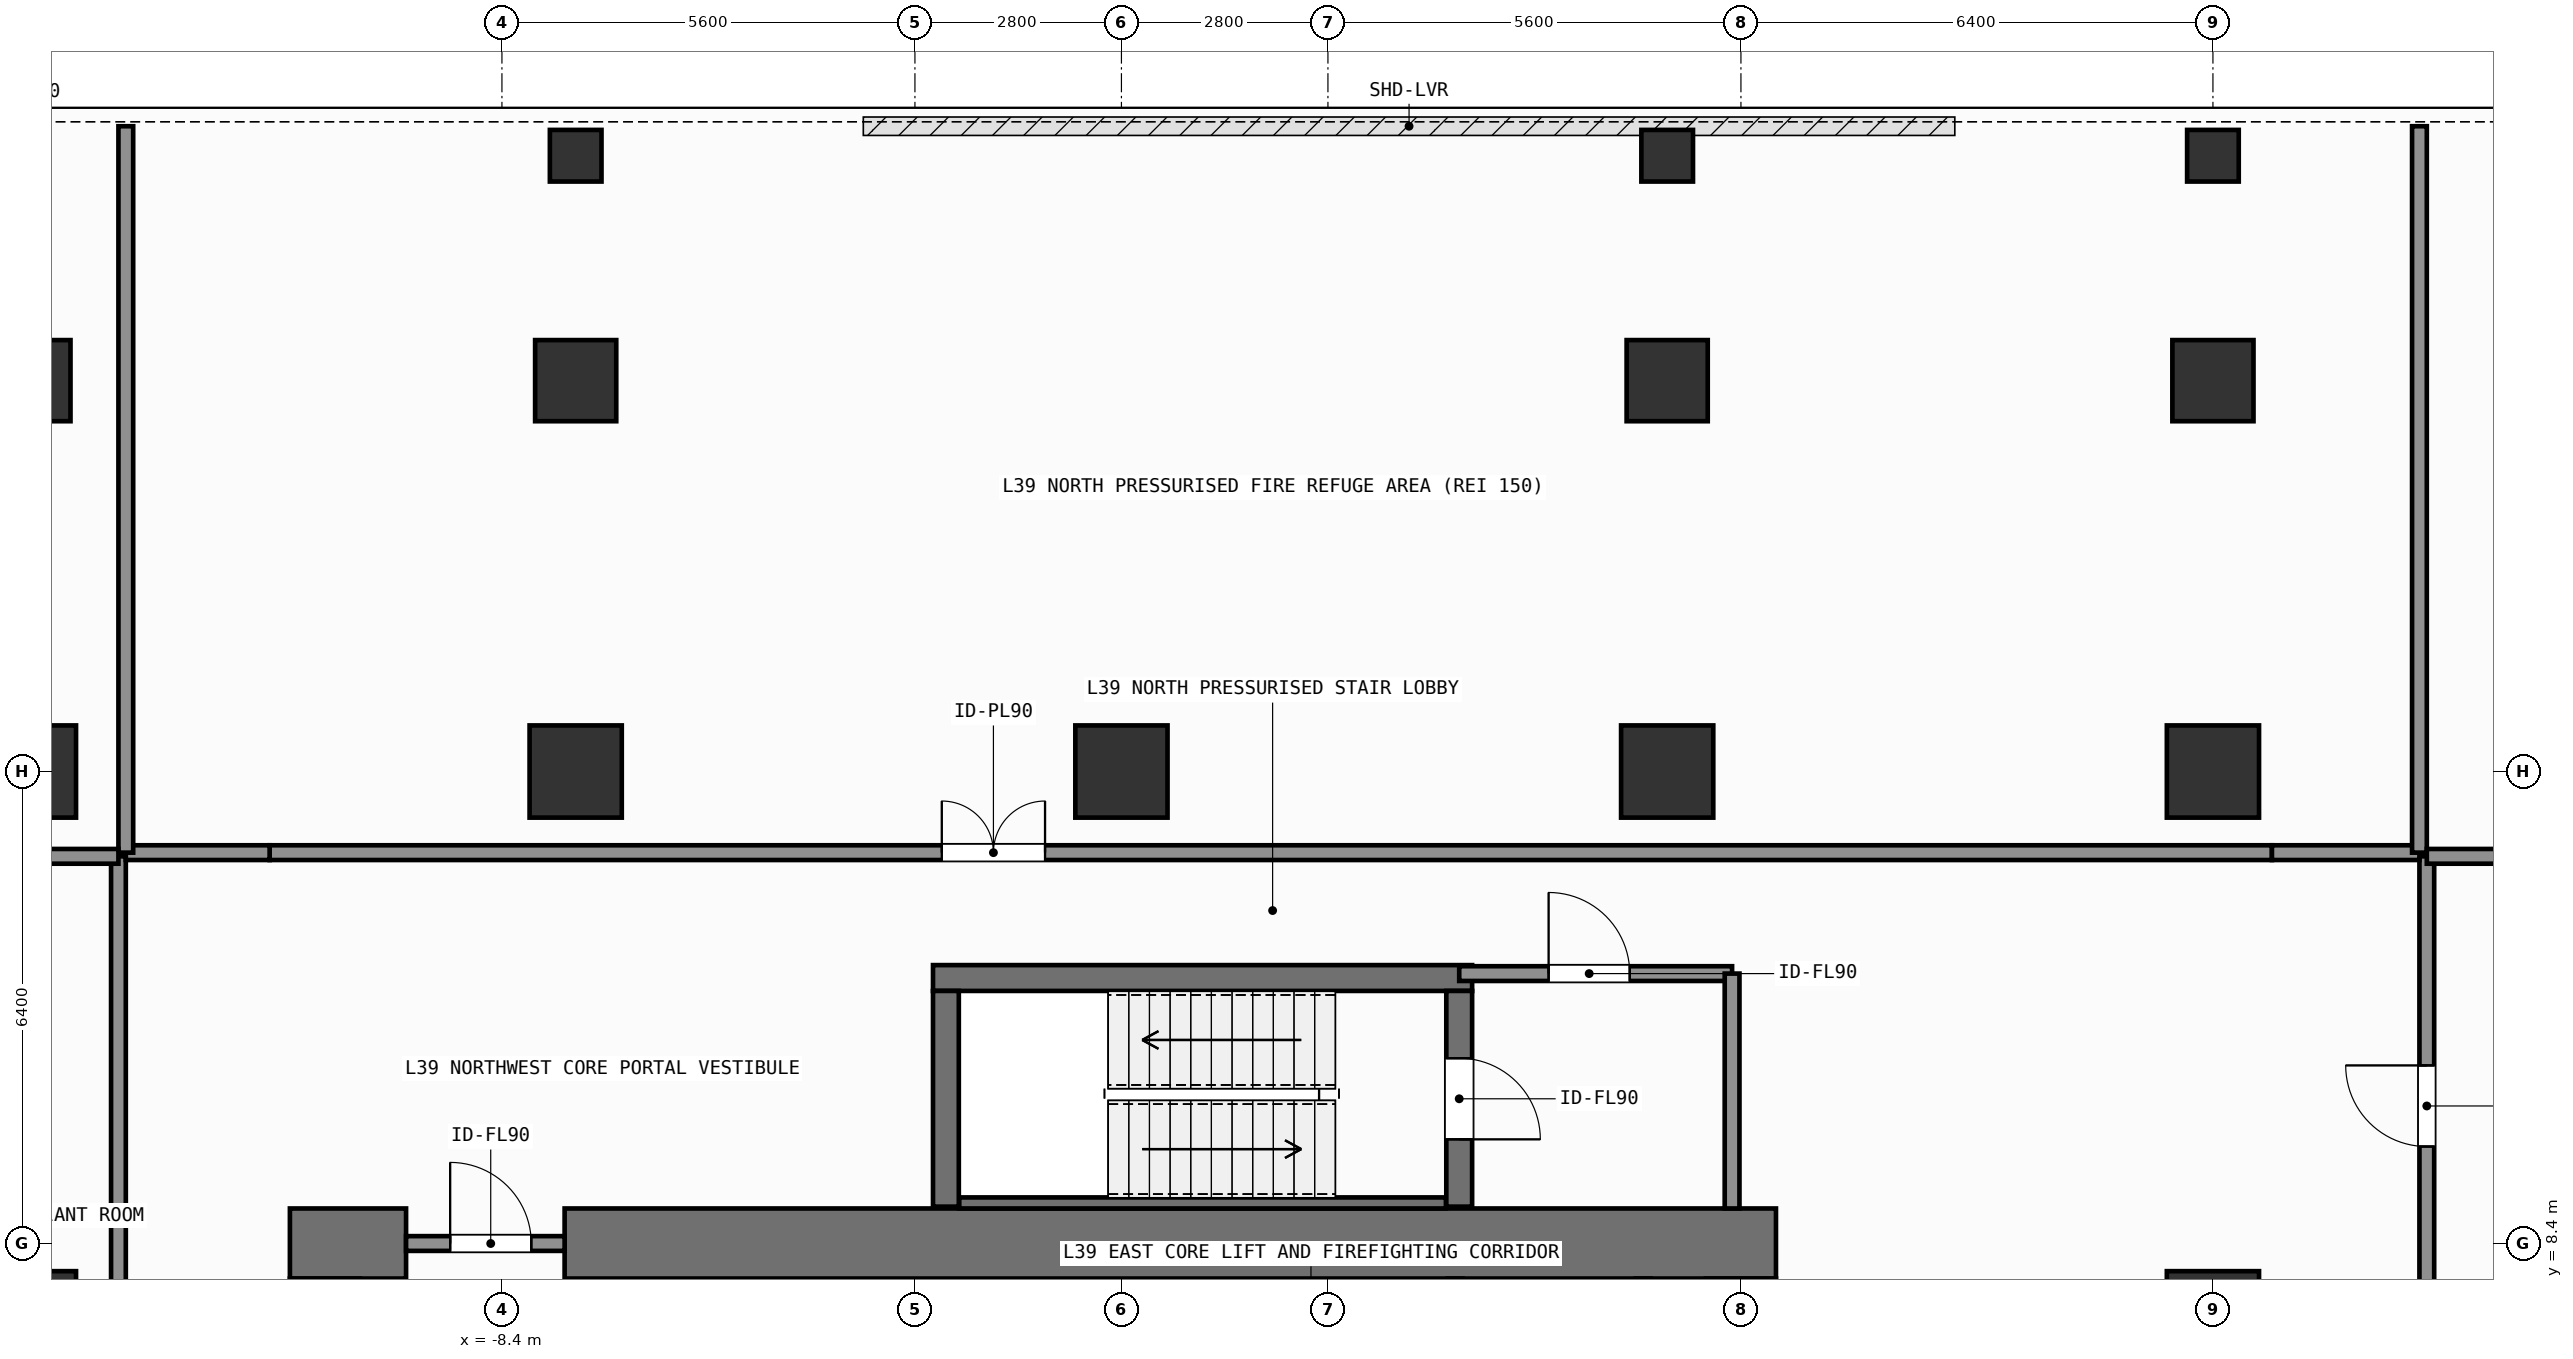
"""IFC4 building model, lengths in metres.
Left out: names, types, materials, properties, quantities, classifications, styles, units other than length and angle.
Written with IfcOpenShell. Run it as: python <this file> out.ifc"""

import sys

from ifc_helpers import new_model, si_unit, direction, frame, frame_2d, origin, origin_2d, place, context, subcontext, project, spatial, rectangle, hollow_rectangle, extrude, element, fill, save


model = new_model("IFC4")
c1 = context("Model", 3, precision=1e-05, world=origin(), true_north=direction((0.0, 1.0)))
c2 = subcontext(c1, "Body", "Model", "MODEL_VIEW")
j1 = project(units=[si_unit("LENGTHUNIT", "METRE"), si_unit("PLANEANGLEUNIT", "RADIAN")], contexts=[c1])
p1 = place(None, origin())
s1 = spatial("IfcSite", under=j1, at=p1, CompositionType="ELEMENT")
p2 = place(p1, origin())
s2 = spatial("IfcBuilding", under=s1, at=p2, CompositionType="ELEMENT")
p3 = place(p2, frame((0.0, 0.0, 156.3)))
s3 = spatial("IfcBuildingStorey", under=s2, at=p3, CompositionType="ELEMENT", Elevation=156.3)
p4 = place(p3, frame((-11.275, 8.4, 0.0), z_axis=(0.0, 0.0, 1.0), x_axis=(1.0, 0.0, 0.0)))
e1 = element("IfcWall", 1, at=p4, inside=s3, PredefinedType="SHEAR", context=c2, shape_type="SweptSolid", body=[
    extrude(rectangle(XDim=1.575, YDim=0.95, at=frame_2d((0.788, 0.0))), origin(), (0.0, 0.0, 1.0), 7.8),
])
p5 = place(p3, frame((-7.55, 8.4, 0.0), z_axis=(0.0, 0.0, 1.0), x_axis=(1.0, 0.0, 0.0)))
e2 = element("IfcWall", 2, at=p5, inside=s3, PredefinedType="SHEAR", context=c2, shape_type="SweptSolid", body=[
    extrude(rectangle(XDim=16.425, YDim=0.95, at=frame_2d((8.212, 0.0))), origin(), (0.0, 0.0, 1.0), 7.8),
])
p6 = place(p3, frame((-10.8, -7.925, 0.0), z_axis=(0.0, 0.0, 1.0), x_axis=(0.0, 1.0, 0.0)))
e3 = element("IfcWall", 3, at=p6, inside=s3, PredefinedType="SHEAR", context=c2, shape_type="SweptSolid", body=[
    extrude(rectangle(XDim=15.85, YDim=0.95, at=frame_2d((7.925, 0.0))), origin(), (0.0, 0.0, 1.0), 7.8),
])
p7 = place(p3, frame((8.4, 5.825, 0.0), z_axis=(0.0, 0.0, 1.0), x_axis=(0.0, 1.0, 0.0)))
e4 = element("IfcWall", 4, at=p7, inside=s3, PredefinedType="SHEAR", context=c2, shape_type="SweptSolid", body=[
    extrude(rectangle(XDim=2.1, YDim=0.95, at=frame_2d((1.05, 0.0))), origin(), (0.0, 0.0, 1.0), 7.8),
])
p8 = place(p3, frame((-2.555, 12.0, 0.0), z_axis=(0.0, 0.0, 1.0), x_axis=(1.0, 0.0, 0.0)))
e5 = element("IfcWall", 5, at=p8, inside=s3, PredefinedType="SHEAR", context=c2, shape_type="SweptSolid", body=[
    extrude(rectangle(XDim=7.31, YDim=0.35, at=frame_2d((3.655, 0.0))), origin(), (0.0, 0.0, 1.0), 7.8),
])
p9 = place(p3, frame((-2.2, 8.95, 0.0), z_axis=(0.0, 0.0, 1.0), x_axis=(1.0, 0.0, 0.0)))
e6 = element("IfcWall", 6, at=p9, inside=s3, PredefinedType="SHEAR", context=c2, shape_type="SweptSolid", body=[
    extrude(rectangle(XDim=6.6, YDim=0.15, at=frame_2d((3.3, 0.0))), origin(), (0.0, 0.0, 1.0), 7.8),
])
p10 = place(p3, frame((-2.38, 8.9, 0.0), z_axis=(0.0, 0.0, 1.0), x_axis=(0.0, 1.0, 0.0)))
e7 = element("IfcWall", 7, at=p10, inside=s3, PredefinedType="SHEAR", context=c2, shape_type="SweptSolid", body=[
    extrude(rectangle(XDim=2.925, YDim=0.35, at=frame_2d((1.462, 0.0))), origin(), (0.0, 0.0, 1.0), 7.8),
])
p11 = place(p3, frame((4.58, 11.825, 0.0), z_axis=(0.0, 0.0, 1.0), x_axis=(0.0, -1.0, 0.0)))
e8 = element("IfcWall", 8, at=p11, inside=s3, PredefinedType="SHEAR", context=c2, shape_type="SweptSolid", body=[
    extrude(rectangle(XDim=2.925, YDim=0.35, at=frame_2d((1.462, 0.0))), origin(), (0.0, 0.0, 1.0), 7.8),
])
p12 = place(p11, frame((0.913, 0.0, 0.0)))
e9 = element("IfcOpeningElement", 9, at=p12, cuts=e8, PredefinedType="OPENING", context=c2, shape_type="SweptSolid", body=[
    extrude(rectangle(XDim=1.1, YDim=2.15, at=frame_2d((0.55, 1.075))), frame((0.0, 0.185, 0.0), z_axis=(0.0, -1.0, 0.0), x_axis=(1.0, 0.0, 0.0)), (0.0, 0.0, 1.0), 0.37),
])
for number, where, z_axis, x_axis in (
    (10, (-14.8, 14.8, 0.0), (0.0, 0.0, 1.0), (1.0, 0.0, 0.0)),
    (11, (-7.4, 14.8, 0.0), (0.0, 0.0, 1.0), (1.0, 0.0, 0.0)),
    (12, (0.0, 14.8, 0.0), (0.0, 0.0, 1.0), (1.0, 0.0, 0.0)),
    (13, (7.4, 14.8, 0.0), (0.0, 0.0, 1.0), (1.0, 0.0, 0.0)),
    (14, (14.8, 14.8, 0.0), (0.0, 0.0, 1.0), (1.0, 0.0, 0.0)),
    (15, (-14.8, 7.4, 0.0), (0.0, 0.0, 1.0), (1.0, 0.0, 0.0)),
    (16, (14.8, 7.4, 0.0), (0.0, 0.0, 1.0), (1.0, 0.0, 0.0)),
):
    element("IfcColumn", number, at=place(p3, frame(where, z_axis=z_axis, x_axis=x_axis)), inside=s3, PredefinedType="COLUMN", context=c2, shape_type="SweptSolid", body=[
        extrude(rectangle(XDim=1.25, YDim=1.25, at=origin_2d()), origin(), (0.0, 0.0, 1.0), 7.8),
    ])
for number, where, z_axis, x_axis in (
    (17, (-14.8, 20.1, 0.0), (0.0, 0.0, 1.0), (1.0, 0.0, 0.0)),
    (18, (-7.4, 20.1, 0.0), (0.0, 0.0, 1.0), (1.0, 0.0, 0.0)),
    (19, (7.4, 20.1, 0.0), (0.0, 0.0, 1.0), (1.0, 0.0, 0.0)),
    (20, (14.8, 20.1, 0.0), (0.0, 0.0, 1.0), (1.0, 0.0, 0.0)),
):
    element("IfcColumn", number, at=place(p3, frame(where, z_axis=z_axis, x_axis=x_axis)), inside=s3, PredefinedType="COLUMN", context=c2, shape_type="SweptSolid", body=[
        extrude(rectangle(XDim=1.1, YDim=1.1, at=origin_2d()), origin(), (0.0, 0.0, 1.0), 7.8),
    ])
for number, where, z_axis, x_axis in (
    (21, (-7.4, 23.15, 0.0), (0.0, 0.0, 1.0), (1.0, 0.0, 0.0)),
    (22, (7.4, 23.15, 0.0), (0.0, 0.0, 1.0), (1.0, 0.0, 0.0)),
    (23, (14.8, 23.15, 0.0), (0.0, 0.0, 1.0), (1.0, 0.0, 0.0)),
):
    element("IfcColumn", number, at=place(p3, frame(where, z_axis=z_axis, x_axis=x_axis)), inside=s3, PredefinedType="COLUMN", context=c2, shape_type="SweptSolid", body=[
        extrude(hollow_rectangle(XDim=0.7, YDim=0.7, WallThickness=0.032, at=origin_2d()), origin(), (0.0, 0.0, 1.0), 7.8),
    ])
p13 = place(p3, frame((4.525, 5.825, 0.0), z_axis=(0.0, 0.0, 1.0), x_axis=(0.0, 1.0, 0.0)))
e24 = element("IfcWall", 24, at=p13, inside=s3, PredefinedType="SHEAR", context=c2, shape_type="SweptSolid", body=[
    extrude(rectangle(XDim=2.1, YDim=0.2, at=frame_2d((1.05, 0.0))), origin(), (0.0, 0.0, 1.0), 7.58),
])
p14 = place(p13, frame((0.425, 0.0, 0.0)))
e25 = element("IfcOpeningElement", 25, at=p14, cuts=e24, PredefinedType="OPENING", context=c2, shape_type="SweptSolid", body=[
    extrude(rectangle(XDim=1.1, YDim=2.2, at=frame_2d((0.55, 1.1))), frame((0.0, 0.11, 0.0), z_axis=(0.0, -1.0, 0.0), x_axis=(1.0, 0.0, 0.0)), (0.0, 0.0, 1.0), 0.22),
])
p15 = place(p3, frame((7.075, 5.825, 0.0), z_axis=(0.0, 0.0, 1.0), x_axis=(0.0, 1.0, 0.0)))
e26 = element("IfcWall", 26, at=p15, inside=s3, PredefinedType="SHEAR", context=c2, shape_type="SweptSolid", body=[
    extrude(rectangle(XDim=2.1, YDim=0.2, at=frame_2d((1.05, 0.0))), origin(), (0.0, 0.0, 1.0), 7.58),
])
p16 = place(p3, frame((4.58, 12.06, 0.0), z_axis=(0.0, 0.0, 1.0), x_axis=(1.0, 0.0, 0.0)))
e27 = element("IfcWall", 27, at=p16, inside=s3, PredefinedType="SOLIDWALL", context=c2, shape_type="SweptSolid", body=[
    extrude(rectangle(XDim=3.7, YDim=0.2, at=frame_2d((1.85, 0.0))), origin(), (0.0, 0.0, 1.0), 7.58),
])
p17 = place(p16, frame((1.212, 0.0, 0.0)))
e28 = element("IfcOpeningElement", 28, at=p17, cuts=e27, PredefinedType="OPENING", context=c2, shape_type="SweptSolid", body=[
    extrude(rectangle(XDim=1.1, YDim=2.15, at=frame_2d((0.55, 1.075))), frame((0.0, 0.11, 0.0), z_axis=(0.0, -1.0, 0.0), x_axis=(1.0, 0.0, 0.0)), (0.0, 0.0, 1.0), 0.22),
])
p18 = place(p3, frame((-9.7, 8.4, 0.0), z_axis=(0.0, 0.0, 1.0), x_axis=(1.0, 0.0, 0.0)))
e29 = element("IfcWall", 29, at=p18, inside=s3, PredefinedType="SOLIDWALL", context=c2, shape_type="SweptSolid", body=[
    extrude(rectangle(XDim=2.15, YDim=0.2, at=frame_2d((1.075, 0.0))), origin(), (0.0, 0.0, 1.0), 6.62),
])
p19 = place(p18, frame((0.598, 0.0, 0.0)))
e30 = element("IfcOpeningElement", 30, at=p19, cuts=e29, PredefinedType="OPENING", context=c2, shape_type="SweptSolid", body=[
    extrude(rectangle(XDim=1.1, YDim=2.15, at=frame_2d((0.55, 1.075))), frame((0.0, 0.11, 0.0), z_axis=(0.0, -1.0, 0.0), x_axis=(1.0, 0.0, 0.0)), (0.0, 0.0, 1.0), 0.22),
])
p20 = place(p3, frame((-11.55, 13.7, 0.0), z_axis=(0.0, 0.0, 1.0), x_axis=(1.0, 0.0, 0.0)))
e31 = element("IfcWall", 31, at=p20, inside=s3, PredefinedType="SOLIDWALL", context=c2, shape_type="SweptSolid", body=[
    extrude(rectangle(XDim=27.15, YDim=0.2, at=frame_2d((13.575, 0.0))), origin(), (0.0, 0.0, 1.0), 7.58),
])
p21 = place(p20, frame((9.114, 0.0, 0.0)))
e32 = element("IfcOpeningElement", 32, at=p21, cuts=e31, PredefinedType="OPENING", context=c2, shape_type="SweptSolid", body=[
    extrude(rectangle(XDim=1.4, YDim=2.2, at=frame_2d((0.7, 1.1))), frame((0.0, 0.11, 0.0), z_axis=(0.0, -1.0, 0.0), x_axis=(1.0, 0.0, 0.0)), (0.0, 0.0, 1.0), 0.22),
])
p22 = place(p3, frame((-13.6, 0.08, 0.0), z_axis=(0.0, 0.0, 1.0), x_axis=(0.0, 1.0, 0.0)))
e33 = element("IfcWall", 33, at=p22, inside=s3, PredefinedType="SOLIDWALL", context=c2, shape_type="SweptSolid", body=[
    extrude(rectangle(XDim=13.57, YDim=0.2, at=frame_2d((6.785, 0.0))), origin(), (0.0, 0.0, 1.0), 7.58),
])
p23 = place(p22, frame((5.52, 0.0, 0.0)))
e34 = element("IfcOpeningElement", 34, at=p23, cuts=e33, PredefinedType="OPENING", context=c2, shape_type="SweptSolid", body=[
    extrude(rectangle(XDim=1.1, YDim=2.15, at=frame_2d((0.55, 1.075))), frame((0.0, 0.11, 0.0), z_axis=(0.0, -1.0, 0.0), x_axis=(1.0, 0.0, 0.0)), (0.0, 0.0, 1.0), 0.22),
])
p24 = place(p3, frame((17.7, 6.88, 0.0), z_axis=(0.0, 0.0, 1.0), x_axis=(0.0, 1.0, 0.0)))
e35 = element("IfcWall", 35, at=p24, inside=s3, PredefinedType="SOLIDWALL", context=c2, shape_type="SweptSolid", body=[
    extrude(rectangle(XDim=6.77, YDim=0.2, at=frame_2d((3.385, 0.0))), origin(), (0.0, 0.0, 1.0), 7.58),
])
p25 = place(p24, frame((2.835, 0.0, 0.0)))
e36 = element("IfcOpeningElement", 36, at=p25, cuts=e35, PredefinedType="OPENING", context=c2, shape_type="SweptSolid", body=[
    extrude(rectangle(XDim=1.1, YDim=2.15, at=frame_2d((0.55, 1.075))), frame((0.0, 0.11, 0.0), z_axis=(0.0, -1.0, 0.0), x_axis=(1.0, 0.0, 0.0)), (0.0, 0.0, 1.0), 0.22),
])
p26 = place(p3, frame((8.28, 8.875, 0.0), z_axis=(0.0, 0.0, 1.0), x_axis=(0.0, 1.0, 0.0)))
e37 = element("IfcWall", 37, at=p26, inside=s3, PredefinedType="SOLIDWALL", context=c2, shape_type="SweptSolid", body=[
    extrude(rectangle(XDim=3.185, YDim=0.2, at=frame_2d((1.593, 0.0))), origin(), (0.0, 0.0, 1.0), 7.58),
])
p27 = place(p3, frame((-13.5, 13.7, 0.0), z_axis=(0.0, 0.0, 1.0), x_axis=(1.0, 0.0, 0.0)))
e38 = element("IfcWall", 38, at=p27, inside=s3, PredefinedType="SOLIDWALL", context=c2, shape_type="SweptSolid", body=[
    extrude(rectangle(XDim=1.95, YDim=0.2, at=frame_2d((0.975, 0.0))), origin(), (0.0, 0.0, 1.0), 7.58),
])
p28 = place(p3, frame((15.6, 13.7, 0.0), z_axis=(0.0, 0.0, 1.0), x_axis=(1.0, 0.0, 0.0)))
e39 = element("IfcWall", 39, at=p28, inside=s3, PredefinedType="SOLIDWALL", context=c2, shape_type="SweptSolid", body=[
    extrude(rectangle(XDim=2.0, YDim=0.2, at=frame_2d((1.0, 0.0))), origin(), (0.0, 0.0, 1.0), 7.58),
])
for number, where, z_axis, x_axis in (
    (40, (-13.5, 13.7, 0.0), (0.0, 0.0, 1.0), (0.0, 1.0, 0.0)),
    (41, (17.6, 13.7, 0.0), (0.0, 0.0, 1.0), (0.0, 1.0, 0.0)),
):
    element("IfcWall", number, at=place(p3, frame(where, z_axis=z_axis, x_axis=x_axis)), inside=s3, PredefinedType="SOLIDWALL", context=c2, shape_type="SweptSolid", body=[
        extrude(rectangle(XDim=9.85, YDim=0.2, at=frame_2d((4.925, 0.0))), origin(), (0.0, 0.0, 1.0), 7.58),
    ])
p29 = place(p3, frame((-19.65, 13.65, 0.0), z_axis=(0.0, 0.0, 1.0), x_axis=(1.0, 0.0, 0.0)))
e42 = element("IfcWall", 42, at=p29, inside=s3, PredefinedType="SOLIDWALL", context=c2, shape_type="SweptSolid", body=[
    extrude(rectangle(XDim=6.05, YDim=0.2, at=frame_2d((3.025, 0.0))), origin(), (0.0, 0.0, 1.0), 7.58),
])
p30 = place(p3, frame((17.7, 13.65, 0.0), z_axis=(0.0, 0.0, 1.0), x_axis=(1.0, 0.0, 0.0)))
e43 = element("IfcWall", 43, at=p30, inside=s3, PredefinedType="SOLIDWALL", context=c2, shape_type="SweptSolid", body=[
    extrude(rectangle(XDim=9.75, YDim=0.2, at=frame_2d((4.875, 0.0))), origin(), (0.0, 0.0, 1.0), 7.58),
])
p31 = place(p12, origin())
e44 = element("IfcDoor", 44, at=p31, inside=s3, OperationType="SINGLE_SWING_RIGHT", PredefinedType="DOOR", context=c2, shape_type="SweptSolid", body=[
    extrude(rectangle(XDim=1.1, YDim=2.15, at=frame_2d((0.55, 1.075))), frame((0.0, 0.025, 0.0), z_axis=(0.0, -1.0, 0.0), x_axis=(1.0, 0.0, 0.0)), (0.0, 0.0, 1.0), 0.05),
])
fill(e9, e44)
p32 = place(p17, origin())
e45 = element("IfcDoor", 45, at=p32, inside=s3, OperationType="SINGLE_SWING_LEFT", PredefinedType="DOOR", context=c2, shape_type="SweptSolid", body=[
    extrude(rectangle(XDim=1.1, YDim=2.15, at=frame_2d((0.55, 1.075))), frame((0.0, 0.025, 0.0), z_axis=(0.0, -1.0, 0.0), x_axis=(1.0, 0.0, 0.0)), (0.0, 0.0, 1.0), 0.05),
])
fill(e28, e45)
p33 = place(p19, origin())
e46 = element("IfcDoor", 46, at=p33, inside=s3, OperationType="SINGLE_SWING_LEFT", PredefinedType="DOOR", context=c2, shape_type="SweptSolid", body=[
    extrude(rectangle(XDim=1.1, YDim=2.15, at=frame_2d((0.55, 1.075))), frame((0.0, 0.025, 0.0), z_axis=(0.0, -1.0, 0.0), x_axis=(1.0, 0.0, 0.0)), (0.0, 0.0, 1.0), 0.05),
])
fill(e30, e46)
p34 = place(p21, origin())
e47 = element("IfcDoor", 47, at=p34, inside=s3, OperationType="SINGLE_SWING_LEFT", PredefinedType="DOOR", context=c2, shape_type="SweptSolid", body=[
    extrude(rectangle(XDim=1.4, YDim=2.2, at=frame_2d((0.7, 1.1))), frame((0.0, 0.025, 0.0), z_axis=(0.0, -1.0, 0.0), x_axis=(1.0, 0.0, 0.0)), (0.0, 0.0, 1.0), 0.05),
])
fill(e32, e47)
p35 = place(p25, origin())
e48 = element("IfcDoor", 48, at=p35, inside=s3, OperationType="SINGLE_SWING_RIGHT", PredefinedType="DOOR", context=c2, shape_type="SweptSolid", body=[
    extrude(rectangle(XDim=1.1, YDim=2.15, at=frame_2d((0.55, 1.075))), frame((0.0, 0.025, 0.0), z_axis=(0.0, -1.0, 0.0), x_axis=(1.0, 0.0, 0.0)), (0.0, 0.0, 1.0), 0.05),
])
fill(e36, e48)
save(model, sys.argv[1])
